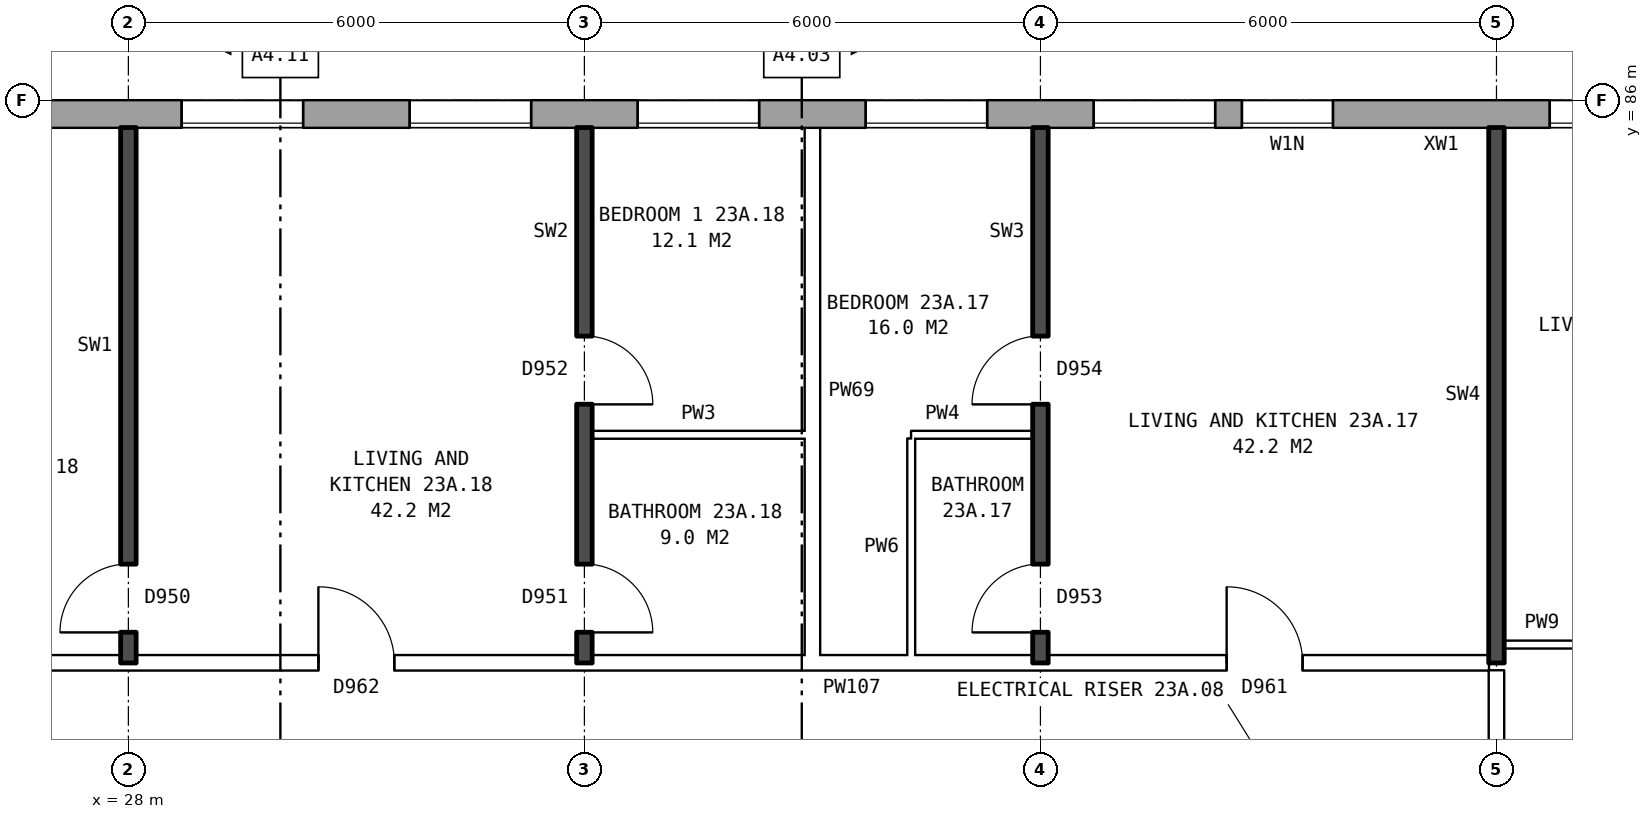
"""IFC4 building model, lengths in metres.
Left out: names, types, materials, properties, quantities, classifications, styles, units other than length and angle.
Written with IfcOpenShell. Run it as: python <this file> out.ifc"""

import sys

from ifc_helpers import new_model, si_unit, direction, frame, frame_2d, origin, place, context, subcontext, project, spatial, rectangle, extrude, element, fill, save


model = new_model("IFC4")
c1 = context("Model", 3, precision=1e-05, world=origin(), true_north=direction((0.0, 1.0)))
c2 = subcontext(c1, "Body", "Model", "MODEL_VIEW")
j1 = project(units=[si_unit("LENGTHUNIT", "METRE"), si_unit("PLANEANGLEUNIT", "RADIAN")], contexts=[c1])
p1 = place(None, origin())
s1 = spatial("IfcSite", under=j1, at=p1, CompositionType="ELEMENT")
p2 = place(p1, origin())
s2 = spatial("IfcBuilding", under=s1, at=p2, CompositionType="ELEMENT")
p3 = place(p2, frame((0.0, 0.0, 84.0)))
s3 = spatial("IfcBuildingStorey", under=s2, at=p3, CompositionType="ELEMENT", Elevation=84.0)
p4 = place(p3, frame((72.925, 85.82, 0.0), z_axis=(0.0, 0.0, 1.0), x_axis=(-1.0, 0.0, 0.0)))
e1 = element("IfcWall", 1, at=p4, inside=s3, PredefinedType="STANDARD", context=c2, shape_type="SweptSolid", body=[
    extrude(rectangle(XDim=46.601, YDim=0.36, at=frame_2d((23.3, 0.0))), origin(), (0.0, 0.0, 1.0), 2.85),
])
p5 = place(p4, frame((0.625, 0.0, 0.8)))
e2 = element("IfcOpeningElement", 2, at=p5, cuts=e1, PredefinedType="OPENING", context=c2, shape_type="SweptSolid", body=[
    extrude(rectangle(XDim=1.6, YDim=1.8, at=frame_2d((0.8, 0.9))), frame((0.0, 0.19, 0.0), z_axis=(0.0, -1.0, 0.0), x_axis=(1.0, 0.0, 0.0)), (0.0, 0.0, 1.0), 0.38),
])
p6 = place(p4, frame((3.625, 0.0, 0.8)))
e3 = element("IfcOpeningElement", 3, at=p6, cuts=e1, PredefinedType="OPENING", context=c2, shape_type="SweptSolid", body=[
    extrude(rectangle(XDim=1.6, YDim=1.8, at=frame_2d((0.8, 0.9))), frame((0.0, 0.19, 0.0), z_axis=(0.0, -1.0, 0.0), x_axis=(1.0, 0.0, 0.0)), (0.0, 0.0, 1.0), 0.38),
])
p7 = place(p4, frame((6.625, 0.0, 0.8)))
e4 = element("IfcOpeningElement", 4, at=p7, cuts=e1, PredefinedType="OPENING", context=c2, shape_type="SweptSolid", body=[
    extrude(rectangle(XDim=1.6, YDim=1.8, at=frame_2d((0.8, 0.9))), frame((0.0, 0.19, 0.0), z_axis=(0.0, -1.0, 0.0), x_axis=(1.0, 0.0, 0.0)), (0.0, 0.0, 1.0), 0.38),
])
p8 = place(p4, frame((9.625, 0.0, 0.8)))
e5 = element("IfcOpeningElement", 5, at=p8, cuts=e1, PredefinedType="OPENING", context=c2, shape_type="SweptSolid", body=[
    extrude(rectangle(XDim=1.6, YDim=1.8, at=frame_2d((0.8, 0.9))), frame((0.0, 0.19, 0.0), z_axis=(0.0, -1.0, 0.0), x_axis=(1.0, 0.0, 0.0)), (0.0, 0.0, 1.0), 0.38),
])
p9 = place(p4, frame((12.625, 0.0, 0.8)))
e6 = element("IfcOpeningElement", 6, at=p9, cuts=e1, PredefinedType="OPENING", context=c2, shape_type="SweptSolid", body=[
    extrude(rectangle(XDim=1.6, YDim=1.8, at=frame_2d((0.8, 0.9))), frame((0.0, 0.19, 0.0), z_axis=(0.0, -1.0, 0.0), x_axis=(1.0, 0.0, 0.0)), (0.0, 0.0, 1.0), 0.38),
])
p10 = place(p4, frame((15.125, 0.0, 0.8)))
e7 = element("IfcOpeningElement", 7, at=p10, cuts=e1, PredefinedType="OPENING", context=c2, shape_type="SweptSolid", body=[
    extrude(rectangle(XDim=1.6, YDim=1.8, at=frame_2d((0.8, 0.9))), frame((0.0, 0.19, 0.0), z_axis=(0.0, -1.0, 0.0), x_axis=(1.0, 0.0, 0.0)), (0.0, 0.0, 1.0), 0.38),
])
p11 = place(p4, frame((18.625, 0.0, 0.35)))
e8 = element("IfcOpeningElement", 8, at=p11, cuts=e1, PredefinedType="OPENING", context=c2, shape_type="SweptSolid", body=[
    extrude(rectangle(XDim=0.8, YDim=0.9, at=frame_2d((0.4, 0.45))), frame((0.0, 0.19, 0.0), z_axis=(0.0, -1.0, 0.0), x_axis=(1.0, 0.0, 0.0)), (0.0, 0.0, 1.0), 0.38),
])
p12 = place(p4, frame((21.625, 0.0, 0.8)))
e9 = element("IfcOpeningElement", 9, at=p12, cuts=e1, PredefinedType="OPENING", context=c2, shape_type="SweptSolid", body=[
    extrude(rectangle(XDim=1.6, YDim=1.8, at=frame_2d((0.8, 0.9))), frame((0.0, 0.19, 0.0), z_axis=(0.0, -1.0, 0.0), x_axis=(1.0, 0.0, 0.0)), (0.0, 0.0, 1.0), 0.38),
])
p13 = place(p4, frame((24.625, 0.0, 0.8)))
e10 = element("IfcOpeningElement", 10, at=p13, cuts=e1, PredefinedType="OPENING", context=c2, shape_type="SweptSolid", body=[
    extrude(rectangle(XDim=1.6, YDim=1.8, at=frame_2d((0.8, 0.9))), frame((0.0, 0.19, 0.0), z_axis=(0.0, -1.0, 0.0), x_axis=(1.0, 0.0, 0.0)), (0.0, 0.0, 1.0), 0.38),
])
p14 = place(p4, frame((29.075, 0.0, 1.4)))
e11 = element("IfcOpeningElement", 11, at=p14, cuts=e1, PredefinedType="OPENING", context=c2, shape_type="SweptSolid", body=[
    extrude(rectangle(XDim=1.2, YDim=1.2, at=frame_2d((0.6, 0.6))), frame((0.0, 0.19, 0.0), z_axis=(0.0, -1.0, 0.0), x_axis=(1.0, 0.0, 0.0)), (0.0, 0.0, 1.0), 0.38),
])
p15 = place(p4, frame((30.625, 0.0, 0.8)))
e12 = element("IfcOpeningElement", 12, at=p15, cuts=e1, PredefinedType="OPENING", context=c2, shape_type="SweptSolid", body=[
    extrude(rectangle(XDim=1.6, YDim=1.8, at=frame_2d((0.8, 0.9))), frame((0.0, 0.19, 0.0), z_axis=(0.0, -1.0, 0.0), x_axis=(1.0, 0.0, 0.0)), (0.0, 0.0, 1.0), 0.38),
])
p16 = place(p4, frame((33.625, 0.0, 0.8)))
e13 = element("IfcOpeningElement", 13, at=p16, cuts=e1, PredefinedType="OPENING", context=c2, shape_type="SweptSolid", body=[
    extrude(rectangle(XDim=1.6, YDim=1.8, at=frame_2d((0.8, 0.9))), frame((0.0, 0.19, 0.0), z_axis=(0.0, -1.0, 0.0), x_axis=(1.0, 0.0, 0.0)), (0.0, 0.0, 1.0), 0.38),
])
p17 = place(p4, frame((36.625, 0.0, 0.8)))
e14 = element("IfcOpeningElement", 14, at=p17, cuts=e1, PredefinedType="OPENING", context=c2, shape_type="SweptSolid", body=[
    extrude(rectangle(XDim=1.6, YDim=1.8, at=frame_2d((0.8, 0.9))), frame((0.0, 0.19, 0.0), z_axis=(0.0, -1.0, 0.0), x_axis=(1.0, 0.0, 0.0)), (0.0, 0.0, 1.0), 0.38),
])
p18 = place(p4, frame((39.625, 0.0, 0.8)))
e15 = element("IfcOpeningElement", 15, at=p18, cuts=e1, PredefinedType="OPENING", context=c2, shape_type="SweptSolid", body=[
    extrude(rectangle(XDim=1.6, YDim=1.8, at=frame_2d((0.8, 0.9))), frame((0.0, 0.19, 0.0), z_axis=(0.0, -1.0, 0.0), x_axis=(1.0, 0.0, 0.0)), (0.0, 0.0, 1.0), 0.38),
])
p19 = place(p4, frame((42.625, 0.0, 0.8)))
e16 = element("IfcOpeningElement", 16, at=p19, cuts=e1, PredefinedType="OPENING", context=c2, shape_type="SweptSolid", body=[
    extrude(rectangle(XDim=1.6, YDim=1.8, at=frame_2d((0.8, 0.9))), frame((0.0, 0.19, 0.0), z_axis=(0.0, -1.0, 0.0), x_axis=(1.0, 0.0, 0.0)), (0.0, 0.0, 1.0), 0.38),
])
p20 = place(p4, frame((17.025, 0.0, 1.5)))
e17 = element("IfcOpeningElement", 17, at=p20, cuts=e1, PredefinedType="OPENING", context=c2, shape_type="SweptSolid", body=[
    extrude(rectangle(XDim=0.6, YDim=0.9, at=frame_2d((0.3, 0.45))), frame((0.0, 0.19, 0.0), z_axis=(0.0, -1.0, 0.0), x_axis=(1.0, 0.0, 0.0)), (0.0, 0.0, 1.0), 0.38),
])
p21 = place(p4, frame((19.725, 0.0, 0.35)))
e18 = element("IfcOpeningElement", 18, at=p21, cuts=e1, PredefinedType="OPENING", context=c2, shape_type="SweptSolid", body=[
    extrude(rectangle(XDim=1.0, YDim=1.8, at=frame_2d((0.5, 0.9))), frame((0.0, 0.19, 0.0), z_axis=(0.0, -1.0, 0.0), x_axis=(1.0, 0.0, 0.0)), (0.0, 0.0, 1.0), 0.38),
])
p22 = place(p3, frame((23.61, 78.6, 0.0), z_axis=(0.0, 0.0, 1.0), x_axis=(1.0, 0.0, 0.0)))
e19 = element("IfcWall", 19, at=p22, inside=s3, PredefinedType="PARTITIONING", context=c2, shape_type="SweptSolid", body=[
    extrude(rectangle(XDim=22.29, YDim=0.2, at=frame_2d((11.145, 0.0))), origin(), (0.0, 0.0, 1.0), 2.85),
])
p23 = place(p22, frame((18.84, 0.0, 0.0)))
e20 = element("IfcOpeningElement", 20, at=p23, cuts=e19, PredefinedType="OPENING", context=c2, shape_type="SweptSolid", body=[
    extrude(rectangle(XDim=1.0, YDim=2.1, at=frame_2d((0.5, 1.05))), frame((0.0, 0.11, 0.0), z_axis=(0.0, -1.0, 0.0), x_axis=(1.0, 0.0, 0.0)), (0.0, 0.0, 1.0), 0.22),
])
p24 = place(p22, frame((6.89, 0.0, 0.0)))
e21 = element("IfcOpeningElement", 21, at=p24, cuts=e19, PredefinedType="OPENING", context=c2, shape_type="SweptSolid", body=[
    extrude(rectangle(XDim=1.0, YDim=2.1, at=frame_2d((0.5, 1.05))), frame((0.0, 0.11, 0.0), z_axis=(0.0, -1.0, 0.0), x_axis=(1.0, 0.0, 0.0)), (0.0, 0.0, 1.0), 0.22),
])
p25 = place(p3, frame((46.1, 78.84, 0.0), z_axis=(0.0, 0.0, 1.0), x_axis=(1.0, 0.0, 0.0)))
e22 = element("IfcWall", 22, at=p25, inside=s3, PredefinedType="PARTITIONING", context=c2, shape_type="SweptSolid", body=[
    extrude(rectangle(XDim=2.9, YDim=0.1, at=frame_2d((1.45, 0.0))), origin(), (0.0, 0.0, 1.0), 2.85),
])
p26 = place(p25, frame((1.0, 0.0, 0.0)))
e23 = element("IfcOpeningElement", 23, at=p26, cuts=e22, PredefinedType="OPENING", context=c2, shape_type="SweptSolid", body=[
    extrude(rectangle(XDim=0.9, YDim=2.1, at=frame_2d((0.45, 1.05))), frame((0.0, 0.06, 0.0), z_axis=(0.0, -1.0, 0.0), x_axis=(1.0, 0.0, 0.0)), (0.0, 0.0, 1.0), 0.12),
])
p27 = place(p3, frame((34.1, 81.6, 0.0), z_axis=(0.0, 0.0, 1.0), x_axis=(1.0, 0.0, 0.0)))
e24 = element("IfcWall", 24, at=p27, inside=s3, PredefinedType="PARTITIONING", context=c2, shape_type="SweptSolid", body=[
    extrude(rectangle(XDim=2.8, YDim=0.1, at=frame_2d((1.4, 0.0))), origin(), (0.0, 0.0, 1.0), 2.85),
])
p28 = place(p3, frame((38.3, 81.6, 0.0), z_axis=(0.0, 0.0, 1.0), x_axis=(1.0, 0.0, 0.0)))
e25 = element("IfcWall", 25, at=p28, inside=s3, PredefinedType="PARTITIONING", context=c2, shape_type="SweptSolid", body=[
    extrude(rectangle(XDim=1.6, YDim=0.1, at=frame_2d((0.8, 0.0))), origin(), (0.0, 0.0, 1.0), 2.85),
])
p29 = place(p3, frame((28.0, 78.6, 0.0), z_axis=(0.0, 0.0, 1.0), x_axis=(0.0, 1.0, 0.0)))
e26 = element("IfcWall", 26, at=p29, inside=s3, PredefinedType="SOLIDWALL", context=c2, shape_type="SweptSolid", body=[
    extrude(rectangle(XDim=7.04, YDim=0.2, at=frame_2d((3.52, 0.0))), origin(), (0.0, 0.0, 1.0), 2.85),
])
p30 = place(p29, frame((0.4, 0.0, 0.0)))
e27 = element("IfcOpeningElement", 27, at=p30, cuts=e26, PredefinedType="OPENING", context=c2, shape_type="SweptSolid", body=[
    extrude(rectangle(XDim=0.9, YDim=2.1, at=frame_2d((0.45, 1.05))), frame((0.0, 0.11, 0.0), z_axis=(0.0, -1.0, 0.0), x_axis=(1.0, 0.0, 0.0)), (0.0, 0.0, 1.0), 0.22),
])
p31 = place(p3, frame((34.0, 78.6, 0.0), z_axis=(0.0, 0.0, 1.0), x_axis=(0.0, 1.0, 0.0)))
e28 = element("IfcWall", 28, at=p31, inside=s3, PredefinedType="SOLIDWALL", context=c2, shape_type="SweptSolid", body=[
    extrude(rectangle(XDim=7.04, YDim=0.2, at=frame_2d((3.52, 0.0))), origin(), (0.0, 0.0, 1.0), 2.85),
])
p32 = place(p31, frame((3.4, 0.0, 0.0)))
e29 = element("IfcOpeningElement", 29, at=p32, cuts=e28, PredefinedType="OPENING", context=c2, shape_type="SweptSolid", body=[
    extrude(rectangle(XDim=0.9, YDim=2.1, at=frame_2d((0.45, 1.05))), frame((0.0, 0.11, 0.0), z_axis=(0.0, -1.0, 0.0), x_axis=(1.0, 0.0, 0.0)), (0.0, 0.0, 1.0), 0.22),
])
p33 = place(p31, frame((0.4, 0.0, 0.0)))
e30 = element("IfcOpeningElement", 30, at=p33, cuts=e28, PredefinedType="OPENING", context=c2, shape_type="SweptSolid", body=[
    extrude(rectangle(XDim=0.9, YDim=2.1, at=frame_2d((0.45, 1.05))), frame((0.0, 0.11, 0.0), z_axis=(0.0, -1.0, 0.0), x_axis=(1.0, 0.0, 0.0)), (0.0, 0.0, 1.0), 0.22),
])
p34 = place(p3, frame((37.0, 78.7, 0.0), z_axis=(0.0, 0.0, 1.0), x_axis=(0.0, 1.0, 0.0)))
e31 = element("IfcWall", 31, at=p34, inside=s3, PredefinedType="PARTITIONING", context=c2, shape_type="SweptSolid", body=[
    extrude(rectangle(XDim=6.94, YDim=0.2, at=frame_2d((3.47, 0.0))), origin(), (0.0, 0.0, 1.0), 2.85),
])
p35 = place(p3, frame((38.3, 78.7, 0.0), z_axis=(0.0, 0.0, 1.0), x_axis=(0.0, 1.0, 0.0)))
e32 = element("IfcWall", 32, at=p35, inside=s3, PredefinedType="PARTITIONING", context=c2, shape_type="SweptSolid", body=[
    extrude(rectangle(XDim=2.85, YDim=0.1, at=frame_2d((1.425, 0.0))), origin(), (0.0, 0.0, 1.0), 2.85),
])
p36 = place(p3, frame((40.0, 78.6, 0.0), z_axis=(0.0, 0.0, 1.0), x_axis=(0.0, 1.0, 0.0)))
e33 = element("IfcWall", 33, at=p36, inside=s3, PredefinedType="SOLIDWALL", context=c2, shape_type="SweptSolid", body=[
    extrude(rectangle(XDim=7.04, YDim=0.2, at=frame_2d((3.52, 0.0))), origin(), (0.0, 0.0, 1.0), 2.85),
])
p37 = place(p36, frame((3.4, 0.0, 0.0)))
e34 = element("IfcOpeningElement", 34, at=p37, cuts=e33, PredefinedType="OPENING", context=c2, shape_type="SweptSolid", body=[
    extrude(rectangle(XDim=0.9, YDim=2.1, at=frame_2d((0.45, 1.05))), frame((0.0, 0.11, 0.0), z_axis=(0.0, -1.0, 0.0), x_axis=(1.0, 0.0, 0.0)), (0.0, 0.0, 1.0), 0.22),
])
p38 = place(p36, frame((0.4, 0.0, 0.0)))
e35 = element("IfcOpeningElement", 35, at=p38, cuts=e33, PredefinedType="OPENING", context=c2, shape_type="SweptSolid", body=[
    extrude(rectangle(XDim=0.9, YDim=2.1, at=frame_2d((0.45, 1.05))), frame((0.0, 0.11, 0.0), z_axis=(0.0, -1.0, 0.0), x_axis=(1.0, 0.0, 0.0)), (0.0, 0.0, 1.0), 0.22),
])
p39 = place(p3, frame((46.0, 76.3, 0.0), z_axis=(0.0, 0.0, 1.0), x_axis=(0.0, 1.0, 0.0)))
e36 = element("IfcWall", 36, at=p39, inside=s3, PredefinedType="PARTITIONING", context=c2, shape_type="SweptSolid", body=[
    extrude(rectangle(XDim=2.2, YDim=0.2, at=frame_2d((1.1, 0.0))), origin(), (0.0, 0.0, 1.0), 2.85),
])
p40 = place(p3, frame((46.0, 78.6, 0.0), z_axis=(0.0, 0.0, 1.0), x_axis=(0.0, 1.0, 0.0)))
e37 = element("IfcWall", 37, at=p40, inside=s3, PredefinedType="SOLIDWALL", context=c2, shape_type="SweptSolid", body=[
    extrude(rectangle(XDim=7.04, YDim=0.2, at=frame_2d((3.52, 0.0))), origin(), (0.0, 0.0, 1.0), 2.85),
])
p41 = place(p13, origin())
e38 = element("IfcWindow", 38, at=p41, inside=s3, PartitioningType="SINGLE_PANEL", PredefinedType="WINDOW", context=c2, shape_type="SweptSolid", body=[
    extrude(rectangle(XDim=1.6, YDim=1.8, at=frame_2d((0.8, 0.9))), frame((0.0, 0.15, 0.0), z_axis=(0.0, -1.0, 0.0), x_axis=(1.0, 0.0, 0.0)), (0.0, 0.0, 1.0), 0.06),
])
fill(e10, e38)
p42 = place(p14, origin())
e39 = element("IfcWindow", 39, at=p42, inside=s3, PartitioningType="SINGLE_PANEL", PredefinedType="WINDOW", context=c2, shape_type="SweptSolid", body=[
    extrude(rectangle(XDim=1.2, YDim=1.2, at=frame_2d((0.6, 0.6))), frame((0.0, 0.15, 0.0), z_axis=(0.0, -1.0, 0.0), x_axis=(1.0, 0.0, 0.0)), (0.0, 0.0, 1.0), 0.06),
])
fill(e11, e39)
p43 = place(p15, origin())
e40 = element("IfcWindow", 40, at=p43, inside=s3, PartitioningType="SINGLE_PANEL", PredefinedType="WINDOW", context=c2, shape_type="SweptSolid", body=[
    extrude(rectangle(XDim=1.6, YDim=1.8, at=frame_2d((0.8, 0.9))), frame((0.0, 0.15, 0.0), z_axis=(0.0, -1.0, 0.0), x_axis=(1.0, 0.0, 0.0)), (0.0, 0.0, 1.0), 0.06),
])
fill(e12, e40)
p44 = place(p16, origin())
e41 = element("IfcWindow", 41, at=p44, inside=s3, PartitioningType="SINGLE_PANEL", PredefinedType="WINDOW", context=c2, shape_type="SweptSolid", body=[
    extrude(rectangle(XDim=1.6, YDim=1.8, at=frame_2d((0.8, 0.9))), frame((0.0, 0.15, 0.0), z_axis=(0.0, -1.0, 0.0), x_axis=(1.0, 0.0, 0.0)), (0.0, 0.0, 1.0), 0.06),
])
fill(e13, e41)
p45 = place(p17, origin())
e42 = element("IfcWindow", 42, at=p45, inside=s3, PartitioningType="SINGLE_PANEL", PredefinedType="WINDOW", context=c2, shape_type="SweptSolid", body=[
    extrude(rectangle(XDim=1.6, YDim=1.8, at=frame_2d((0.8, 0.9))), frame((0.0, 0.15, 0.0), z_axis=(0.0, -1.0, 0.0), x_axis=(1.0, 0.0, 0.0)), (0.0, 0.0, 1.0), 0.06),
])
fill(e14, e42)
p46 = place(p18, origin())
e43 = element("IfcWindow", 43, at=p46, inside=s3, PartitioningType="SINGLE_PANEL", PredefinedType="WINDOW", context=c2, shape_type="SweptSolid", body=[
    extrude(rectangle(XDim=1.6, YDim=1.8, at=frame_2d((0.8, 0.9))), frame((0.0, 0.15, 0.0), z_axis=(0.0, -1.0, 0.0), x_axis=(1.0, 0.0, 0.0)), (0.0, 0.0, 1.0), 0.06),
])
fill(e15, e43)
p47 = place(p19, origin())
e44 = element("IfcWindow", 44, at=p47, inside=s3, PartitioningType="SINGLE_PANEL", PredefinedType="WINDOW", context=c2, shape_type="SweptSolid", body=[
    extrude(rectangle(XDim=1.6, YDim=1.8, at=frame_2d((0.8, 0.9))), frame((0.0, 0.15, 0.0), z_axis=(0.0, -1.0, 0.0), x_axis=(1.0, 0.0, 0.0)), (0.0, 0.0, 1.0), 0.06),
])
fill(e16, e44)
p48 = place(p37, origin())
e45 = element("IfcDoor", 45, at=p48, inside=s3, OperationType="SINGLE_SWING_LEFT", PredefinedType="DOOR", context=c2, shape_type="SweptSolid", body=[
    extrude(rectangle(XDim=0.9, YDim=2.1, at=frame_2d((0.45, 1.05))), frame((0.0, 0.025, 0.0), z_axis=(0.0, -1.0, 0.0), x_axis=(1.0, 0.0, 0.0)), (0.0, 0.0, 1.0), 0.05),
])
fill(e34, e45)
p49 = place(p23, origin())
e46 = element("IfcDoor", 46, at=p49, inside=s3, OperationType="SINGLE_SWING_LEFT", PredefinedType="DOOR", context=c2, shape_type="SweptSolid", body=[
    extrude(rectangle(XDim=1.0, YDim=2.1, at=frame_2d((0.5, 1.05))), frame((0.0, 0.025, 0.0), z_axis=(0.0, -1.0, 0.0), x_axis=(1.0, 0.0, 0.0)), (0.0, 0.0, 1.0), 0.05),
])
fill(e20, e46)
p50 = place(p38, origin())
e47 = element("IfcDoor", 47, at=p50, inside=s3, OperationType="SINGLE_SWING_LEFT", PredefinedType="DOOR", context=c2, shape_type="SweptSolid", body=[
    extrude(rectangle(XDim=0.9, YDim=2.1, at=frame_2d((0.45, 1.05))), frame((0.0, 0.025, 0.0), z_axis=(0.0, -1.0, 0.0), x_axis=(1.0, 0.0, 0.0)), (0.0, 0.0, 1.0), 0.05),
])
fill(e35, e47)
p51 = place(p32, frame((0.9, 0.0, 0.0), z_axis=(0.0, 0.0, 1.0), x_axis=(-1.0, 0.0, 0.0)))
e48 = element("IfcDoor", 48, at=p51, inside=s3, OperationType="SINGLE_SWING_RIGHT", PredefinedType="DOOR", context=c2, shape_type="SweptSolid", body=[
    extrude(rectangle(XDim=0.9, YDim=2.1, at=frame_2d((0.45, 1.05))), frame((0.0, 0.025, 0.0), z_axis=(0.0, -1.0, 0.0), x_axis=(1.0, 0.0, 0.0)), (0.0, 0.0, 1.0), 0.05),
])
fill(e29, e48)
p52 = place(p30, origin())
e49 = element("IfcDoor", 49, at=p52, inside=s3, OperationType="SINGLE_SWING_LEFT", PredefinedType="DOOR", context=c2, shape_type="SweptSolid", body=[
    extrude(rectangle(XDim=0.9, YDim=2.1, at=frame_2d((0.45, 1.05))), frame((0.0, 0.025, 0.0), z_axis=(0.0, -1.0, 0.0), x_axis=(1.0, 0.0, 0.0)), (0.0, 0.0, 1.0), 0.05),
])
fill(e27, e49)
p53 = place(p24, origin())
e50 = element("IfcDoor", 50, at=p53, inside=s3, OperationType="SINGLE_SWING_LEFT", PredefinedType="DOOR", context=c2, shape_type="SweptSolid", body=[
    extrude(rectangle(XDim=1.0, YDim=2.1, at=frame_2d((0.5, 1.05))), frame((0.0, 0.025, 0.0), z_axis=(0.0, -1.0, 0.0), x_axis=(1.0, 0.0, 0.0)), (0.0, 0.0, 1.0), 0.05),
])
fill(e21, e50)
p54 = place(p33, frame((0.9, 0.0, 0.0), z_axis=(0.0, 0.0, 1.0), x_axis=(-1.0, 0.0, 0.0)))
e51 = element("IfcDoor", 51, at=p54, inside=s3, OperationType="SINGLE_SWING_RIGHT", PredefinedType="DOOR", context=c2, shape_type="SweptSolid", body=[
    extrude(rectangle(XDim=0.9, YDim=2.1, at=frame_2d((0.45, 1.05))), frame((0.0, 0.025, 0.0), z_axis=(0.0, -1.0, 0.0), x_axis=(1.0, 0.0, 0.0)), (0.0, 0.0, 1.0), 0.05),
])
fill(e30, e51)
save(model, sys.argv[1])
